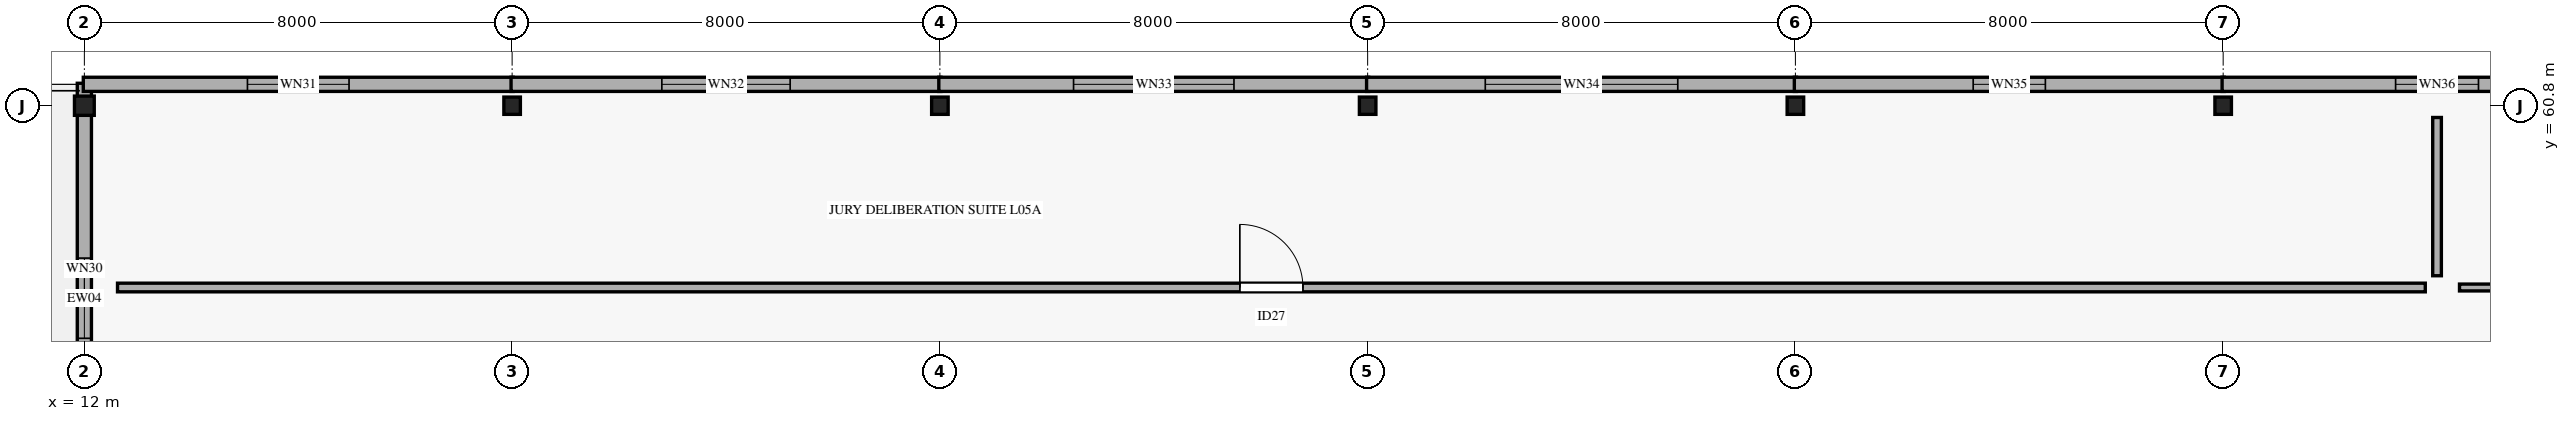
"""IFC4 building model, lengths in metres.
Left out: names, types, materials, properties, quantities, classifications, styles, units other than length and angle.
Written with IfcOpenShell. Run it as: python <this file> out.ifc"""

import sys

from ifc_helpers import new_model, si_unit, direction, frame, frame_2d, origin, origin_2d, place, context, subcontext, project, spatial, rectangle, i_section, extrude, element, fill, save


model = new_model("IFC4")
c1 = context("Model", 3, precision=1e-05, world=origin(), true_north=direction((0.0, 1.0)))
c2 = subcontext(c1, "Body", "Model", "MODEL_VIEW")
j1 = project(units=[si_unit("LENGTHUNIT", "METRE"), si_unit("PLANEANGLEUNIT", "RADIAN")], contexts=[c1])
p1 = place(None, origin())
s1 = spatial("IfcSite", under=j1, at=p1, CompositionType="ELEMENT")
p2 = place(p1, origin())
s2 = spatial("IfcBuilding", under=s1, at=p2, CompositionType="ELEMENT")
p3 = place(p2, frame((0.0, 0.0, 25.2)))
s3 = spatial("IfcBuildingStorey", under=s2, at=p3, CompositionType="ELEMENT", Elevation=25.2)
p4 = place(p3, frame((12.0, 60.8, 0.0), z_axis=(0.0, 0.0, 1.0), x_axis=(1.0, 0.0, 0.0)))
e1 = element("IfcColumn", 1, at=p4, inside=s3, PredefinedType="COLUMN", context=c2, shape_type="SweptSolid", body=[
    extrude(i_section(OverallWidth=0.37, OverallDepth=0.36, WebThickness=0.012, FlangeThickness=0.02, FilletRadius=0.015, at=origin_2d()), origin(), (0.0, 0.0, 1.0), 3.995),
])
for number, where, z_axis, x_axis in (
    (2, (20.0, 60.8, 0.0), (0.0, 0.0, 1.0), (1.0, 0.0, 0.0)),
    (3, (28.0, 60.8, 0.0), (0.0, 0.0, 1.0), (1.0, 0.0, 0.0)),
    (4, (36.0, 60.8, 0.0), (0.0, 0.0, 1.0), (1.0, 0.0, 0.0)),
    (5, (44.0, 60.8, 0.0), (0.0, 0.0, 1.0), (1.0, 0.0, 0.0)),
    (6, (52.0, 60.8, 0.0), (0.0, 0.0, 1.0), (1.0, 0.0, 0.0)),
):
    element("IfcColumn", number, at=place(p3, frame(where, z_axis=z_axis, x_axis=x_axis)), inside=s3, PredefinedType="COLUMN", context=c2, shape_type="SweptSolid", body=[
        extrude(i_section(OverallWidth=0.309, OverallDepth=0.323, WebThickness=0.014, FlangeThickness=0.023, FilletRadius=0.015, at=origin_2d()), origin(), (0.0, 0.0, 1.0), 3.995),
    ])
p5 = place(p3, frame((12.0, 53.18, 0.0), z_axis=(0.0, 0.0, 1.0), x_axis=(0.0, 1.0, 0.0)))
e7 = element("IfcWall", 7, at=p5, inside=s3, PredefinedType="STANDARD", context=c2, shape_type="SweptSolid", body=[
    extrude(rectangle(XDim=8.04, YDim=0.265, at=frame_2d((4.02, 0.0))), origin(), (0.0, 0.0, 1.0), 3.06),
])
p6 = place(p5, frame((3.27, 0.0, 0.75)))
e8 = element("IfcOpeningElement", 8, at=p6, cuts=e7, PredefinedType="OPENING", context=c2, shape_type="SweptSolid", body=[
    extrude(rectangle(XDim=1.5, YDim=1.3, at=frame_2d((0.75, 0.65))), frame((0.0, 0.142, 0.0), z_axis=(0.0, -1.0, 0.0), x_axis=(1.0, 0.0, 0.0)), (0.0, 0.0, 1.0), 0.285),
])
p7 = place(p3, frame((11.98, 61.2, 0.0), z_axis=(0.0, 0.0, 1.0), x_axis=(1.0, 0.0, 0.0)))
e9 = element("IfcWall", 9, at=p7, inside=s3, PredefinedType="STANDARD", context=c2, shape_type="SweptSolid", body=[
    extrude(rectangle(XDim=8.04, YDim=0.265, at=frame_2d((4.02, 0.0))), origin(), (0.0, 0.0, 1.0), 3.06),
])
p8 = place(p7, frame((3.07, 0.0, 0.75)))
e10 = element("IfcOpeningElement", 10, at=p8, cuts=e9, PredefinedType="OPENING", context=c2, shape_type="SweptSolid", body=[
    extrude(rectangle(XDim=1.9, YDim=1.3, at=frame_2d((0.95, 0.65))), frame((0.0, 0.142, 0.0), z_axis=(0.0, -1.0, 0.0), x_axis=(1.0, 0.0, 0.0)), (0.0, 0.0, 1.0), 0.285),
])
p9 = place(p3, frame((19.98, 61.2, 0.0), z_axis=(0.0, 0.0, 1.0), x_axis=(1.0, 0.0, 0.0)))
e11 = element("IfcWall", 11, at=p9, inside=s3, PredefinedType="STANDARD", context=c2, shape_type="SweptSolid", body=[
    extrude(rectangle(XDim=8.04, YDim=0.265, at=frame_2d((4.02, 0.0))), origin(), (0.0, 0.0, 1.0), 3.06),
])
p10 = place(p9, frame((2.82, 0.0, 0.75)))
e12 = element("IfcOpeningElement", 12, at=p10, cuts=e11, PredefinedType="OPENING", context=c2, shape_type="SweptSolid", body=[
    extrude(rectangle(XDim=2.4, YDim=1.3, at=frame_2d((1.2, 0.65))), frame((0.0, 0.142, 0.0), z_axis=(0.0, -1.0, 0.0), x_axis=(1.0, 0.0, 0.0)), (0.0, 0.0, 1.0), 0.285),
])
p11 = place(p3, frame((27.98, 61.2, 0.0), z_axis=(0.0, 0.0, 1.0), x_axis=(1.0, 0.0, 0.0)))
e13 = element("IfcWall", 13, at=p11, inside=s3, PredefinedType="STANDARD", context=c2, shape_type="SweptSolid", body=[
    extrude(rectangle(XDim=8.04, YDim=0.265, at=frame_2d((4.02, 0.0))), origin(), (0.0, 0.0, 1.0), 3.06),
])
p12 = place(p11, frame((2.52, 0.0, 0.75)))
e14 = element("IfcOpeningElement", 14, at=p12, cuts=e13, PredefinedType="OPENING", context=c2, shape_type="SweptSolid", body=[
    extrude(rectangle(XDim=3.0, YDim=1.3, at=frame_2d((1.5, 0.65))), frame((0.0, 0.142, 0.0), z_axis=(0.0, -1.0, 0.0), x_axis=(1.0, 0.0, 0.0)), (0.0, 0.0, 1.0), 0.285),
])
p13 = place(p3, frame((35.98, 61.2, 0.0), z_axis=(0.0, 0.0, 1.0), x_axis=(1.0, 0.0, 0.0)))
e15 = element("IfcWall", 15, at=p13, inside=s3, PredefinedType="STANDARD", context=c2, shape_type="SweptSolid", body=[
    extrude(rectangle(XDim=8.04, YDim=0.265, at=frame_2d((4.02, 0.0))), origin(), (0.0, 0.0, 1.0), 3.06),
])
p14 = place(p13, frame((2.22, 0.0, 0.75)))
e16 = element("IfcOpeningElement", 16, at=p14, cuts=e15, PredefinedType="OPENING", context=c2, shape_type="SweptSolid", body=[
    extrude(rectangle(XDim=3.6, YDim=1.3, at=frame_2d((1.8, 0.65))), frame((0.0, 0.142, 0.0), z_axis=(0.0, -1.0, 0.0), x_axis=(1.0, 0.0, 0.0)), (0.0, 0.0, 1.0), 0.285),
])
p15 = place(p3, frame((43.98, 61.2, 0.0), z_axis=(0.0, 0.0, 1.0), x_axis=(1.0, 0.0, 0.0)))
e17 = element("IfcWall", 17, at=p15, inside=s3, PredefinedType="STANDARD", context=c2, shape_type="SweptSolid", body=[
    extrude(rectangle(XDim=8.04, YDim=0.265, at=frame_2d((4.02, 0.0))), origin(), (0.0, 0.0, 1.0), 3.06),
])
p16 = place(p15, frame((3.345, 0.0, 0.75)))
e18 = element("IfcOpeningElement", 18, at=p16, cuts=e17, PredefinedType="OPENING", context=c2, shape_type="SweptSolid", body=[
    extrude(rectangle(XDim=1.35, YDim=1.9, at=frame_2d((0.675, 0.95))), frame((0.0, 0.142, 0.0), z_axis=(0.0, -1.0, 0.0), x_axis=(1.0, 0.0, 0.0)), (0.0, 0.0, 1.0), 0.285),
])
p17 = place(p3, frame((51.98, 61.2, 0.0), z_axis=(0.0, 0.0, 1.0), x_axis=(1.0, 0.0, 0.0)))
e19 = element("IfcWall", 19, at=p17, inside=s3, PredefinedType="STANDARD", context=c2, shape_type="SweptSolid", body=[
    extrude(rectangle(XDim=8.04, YDim=0.265, at=frame_2d((4.02, 0.0))), origin(), (0.0, 0.0, 1.0), 3.06),
])
p18 = place(p17, frame((3.245, 0.0, 0.75)))
e20 = element("IfcOpeningElement", 20, at=p18, cuts=e19, PredefinedType="OPENING", context=c2, shape_type="SweptSolid", body=[
    extrude(rectangle(XDim=1.55, YDim=1.9, at=frame_2d((0.775, 0.95))), frame((0.0, 0.142, 0.0), z_axis=(0.0, -1.0, 0.0), x_axis=(1.0, 0.0, 0.0)), (0.0, 0.0, 1.0), 0.285),
])
p19 = place(p3, frame((12.62, 57.4, 0.0), z_axis=(0.0, 0.0, 1.0), x_axis=(1.0, 0.0, 0.0)))
e21 = element("IfcWall", 21, at=p19, inside=s3, PredefinedType="PARTITIONING", context=c2, shape_type="SweptSolid", body=[
    extrude(rectangle(XDim=43.16, YDim=0.162, at=frame_2d((21.58, 0.0))), origin(), (0.0, 0.0, 1.0), 2.85),
])
p20 = place(p19, frame((20.99, 0.0, 0.0)))
e22 = element("IfcOpeningElement", 22, at=p20, cuts=e21, PredefinedType="OPENING", context=c2, shape_type="SweptSolid", body=[
    extrude(rectangle(XDim=1.18, YDim=2.3, at=frame_2d((0.59, 1.15))), frame((0.0, 0.091, 0.0), z_axis=(0.0, -1.0, 0.0), x_axis=(1.0, 0.0, 0.0)), (0.0, 0.0, 1.0), 0.182),
])
p21 = place(p3, frame((56.0, 57.62, 0.0), z_axis=(0.0, 0.0, 1.0), x_axis=(0.0, 1.0, 0.0)))
e23 = element("IfcWall", 23, at=p21, inside=s3, PredefinedType="PARTITIONING", context=c2, shape_type="SweptSolid", body=[
    extrude(rectangle(XDim=2.96, YDim=0.162, at=frame_2d((1.48, 0.0))), origin(), (0.0, 0.0, 1.0), 2.85),
])
p22 = place(p3, frame((56.42, 57.4, 0.0), z_axis=(0.0, 0.0, 1.0), x_axis=(1.0, 0.0, 0.0)))
e24 = element("IfcWall", 24, at=p22, inside=s3, PredefinedType="PARTITIONING", context=c2, shape_type="SweptSolid", body=[
    extrude(rectangle(XDim=10.96, YDim=0.128, at=frame_2d((5.48, 0.0))), origin(), (0.0, 0.0, 1.0), 2.85),
])
p23 = place(p22, frame((4.78, 0.0, 0.0)))
e25 = element("IfcOpeningElement", 25, at=p23, cuts=e24, PredefinedType="OPENING", context=c2, shape_type="SweptSolid", body=[
    extrude(rectangle(XDim=1.4, YDim=2.3, at=frame_2d((0.7, 1.15))), frame((0.0, 0.074, 0.0), z_axis=(0.0, -1.0, 0.0), x_axis=(1.0, 0.0, 0.0)), (0.0, 0.0, 1.0), 0.148),
])
p24 = place(p6, origin())
e26 = element("IfcWindow", 26, at=p24, inside=s3, PartitioningType="SINGLE_PANEL", PredefinedType="WINDOW", context=c2, shape_type="SweptSolid", body=[
    extrude(rectangle(XDim=1.5, YDim=1.3, at=frame_2d((0.75, 0.65))), frame((0.0, 0.03, 0.0), z_axis=(0.0, -1.0, 0.0), x_axis=(1.0, 0.0, 0.0)), (0.0, 0.0, 1.0), 0.06),
])
fill(e8, e26)
p25 = place(p8, origin())
e27 = element("IfcWindow", 27, at=p25, inside=s3, PartitioningType="SINGLE_PANEL", PredefinedType="WINDOW", context=c2, shape_type="SweptSolid", body=[
    extrude(rectangle(XDim=1.9, YDim=1.3, at=frame_2d((0.95, 0.65))), frame((0.0, 0.03, 0.0), z_axis=(0.0, -1.0, 0.0), x_axis=(1.0, 0.0, 0.0)), (0.0, 0.0, 1.0), 0.06),
])
fill(e10, e27)
p26 = place(p10, origin())
e28 = element("IfcWindow", 28, at=p26, inside=s3, PartitioningType="SINGLE_PANEL", PredefinedType="WINDOW", context=c2, shape_type="SweptSolid", body=[
    extrude(rectangle(XDim=2.4, YDim=1.3, at=frame_2d((1.2, 0.65))), frame((0.0, 0.03, 0.0), z_axis=(0.0, -1.0, 0.0), x_axis=(1.0, 0.0, 0.0)), (0.0, 0.0, 1.0), 0.06),
])
fill(e12, e28)
p27 = place(p12, origin())
e29 = element("IfcWindow", 29, at=p27, inside=s3, PartitioningType="SINGLE_PANEL", PredefinedType="WINDOW", context=c2, shape_type="SweptSolid", body=[
    extrude(rectangle(XDim=3.0, YDim=1.3, at=frame_2d((1.5, 0.65))), frame((0.0, 0.03, 0.0), z_axis=(0.0, -1.0, 0.0), x_axis=(1.0, 0.0, 0.0)), (0.0, 0.0, 1.0), 0.06),
])
fill(e14, e29)
p28 = place(p14, origin())
e30 = element("IfcWindow", 30, at=p28, inside=s3, PartitioningType="SINGLE_PANEL", PredefinedType="WINDOW", context=c2, shape_type="SweptSolid", body=[
    extrude(rectangle(XDim=3.6, YDim=1.3, at=frame_2d((1.8, 0.65))), frame((0.0, 0.03, 0.0), z_axis=(0.0, -1.0, 0.0), x_axis=(1.0, 0.0, 0.0)), (0.0, 0.0, 1.0), 0.06),
])
fill(e16, e30)
p29 = place(p16, origin())
e31 = element("IfcWindow", 31, at=p29, inside=s3, PartitioningType="SINGLE_PANEL", PredefinedType="WINDOW", context=c2, shape_type="SweptSolid", body=[
    extrude(rectangle(XDim=1.35, YDim=1.9, at=frame_2d((0.675, 0.95))), frame((0.0, 0.03, 0.0), z_axis=(0.0, -1.0, 0.0), x_axis=(1.0, 0.0, 0.0)), (0.0, 0.0, 1.0), 0.06),
])
fill(e18, e31)
p30 = place(p18, origin())
e32 = element("IfcWindow", 32, at=p30, inside=s3, PartitioningType="SINGLE_PANEL", PredefinedType="WINDOW", context=c2, shape_type="SweptSolid", body=[
    extrude(rectangle(XDim=1.55, YDim=1.9, at=frame_2d((0.775, 0.95))), frame((0.0, 0.03, 0.0), z_axis=(0.0, -1.0, 0.0), x_axis=(1.0, 0.0, 0.0)), (0.0, 0.0, 1.0), 0.06),
])
fill(e20, e32)
p31 = place(p20, origin())
e33 = element("IfcDoor", 33, at=p31, inside=s3, OperationType="SINGLE_SWING_LEFT", PredefinedType="DOOR", context=c2, shape_type="SweptSolid", body=[
    extrude(rectangle(XDim=1.18, YDim=2.3, at=frame_2d((0.59, 1.15))), frame((0.0, 0.025, 0.0), z_axis=(0.0, -1.0, 0.0), x_axis=(1.0, 0.0, 0.0)), (0.0, 0.0, 1.0), 0.05),
])
fill(e22, e33)
save(model, sys.argv[1])
